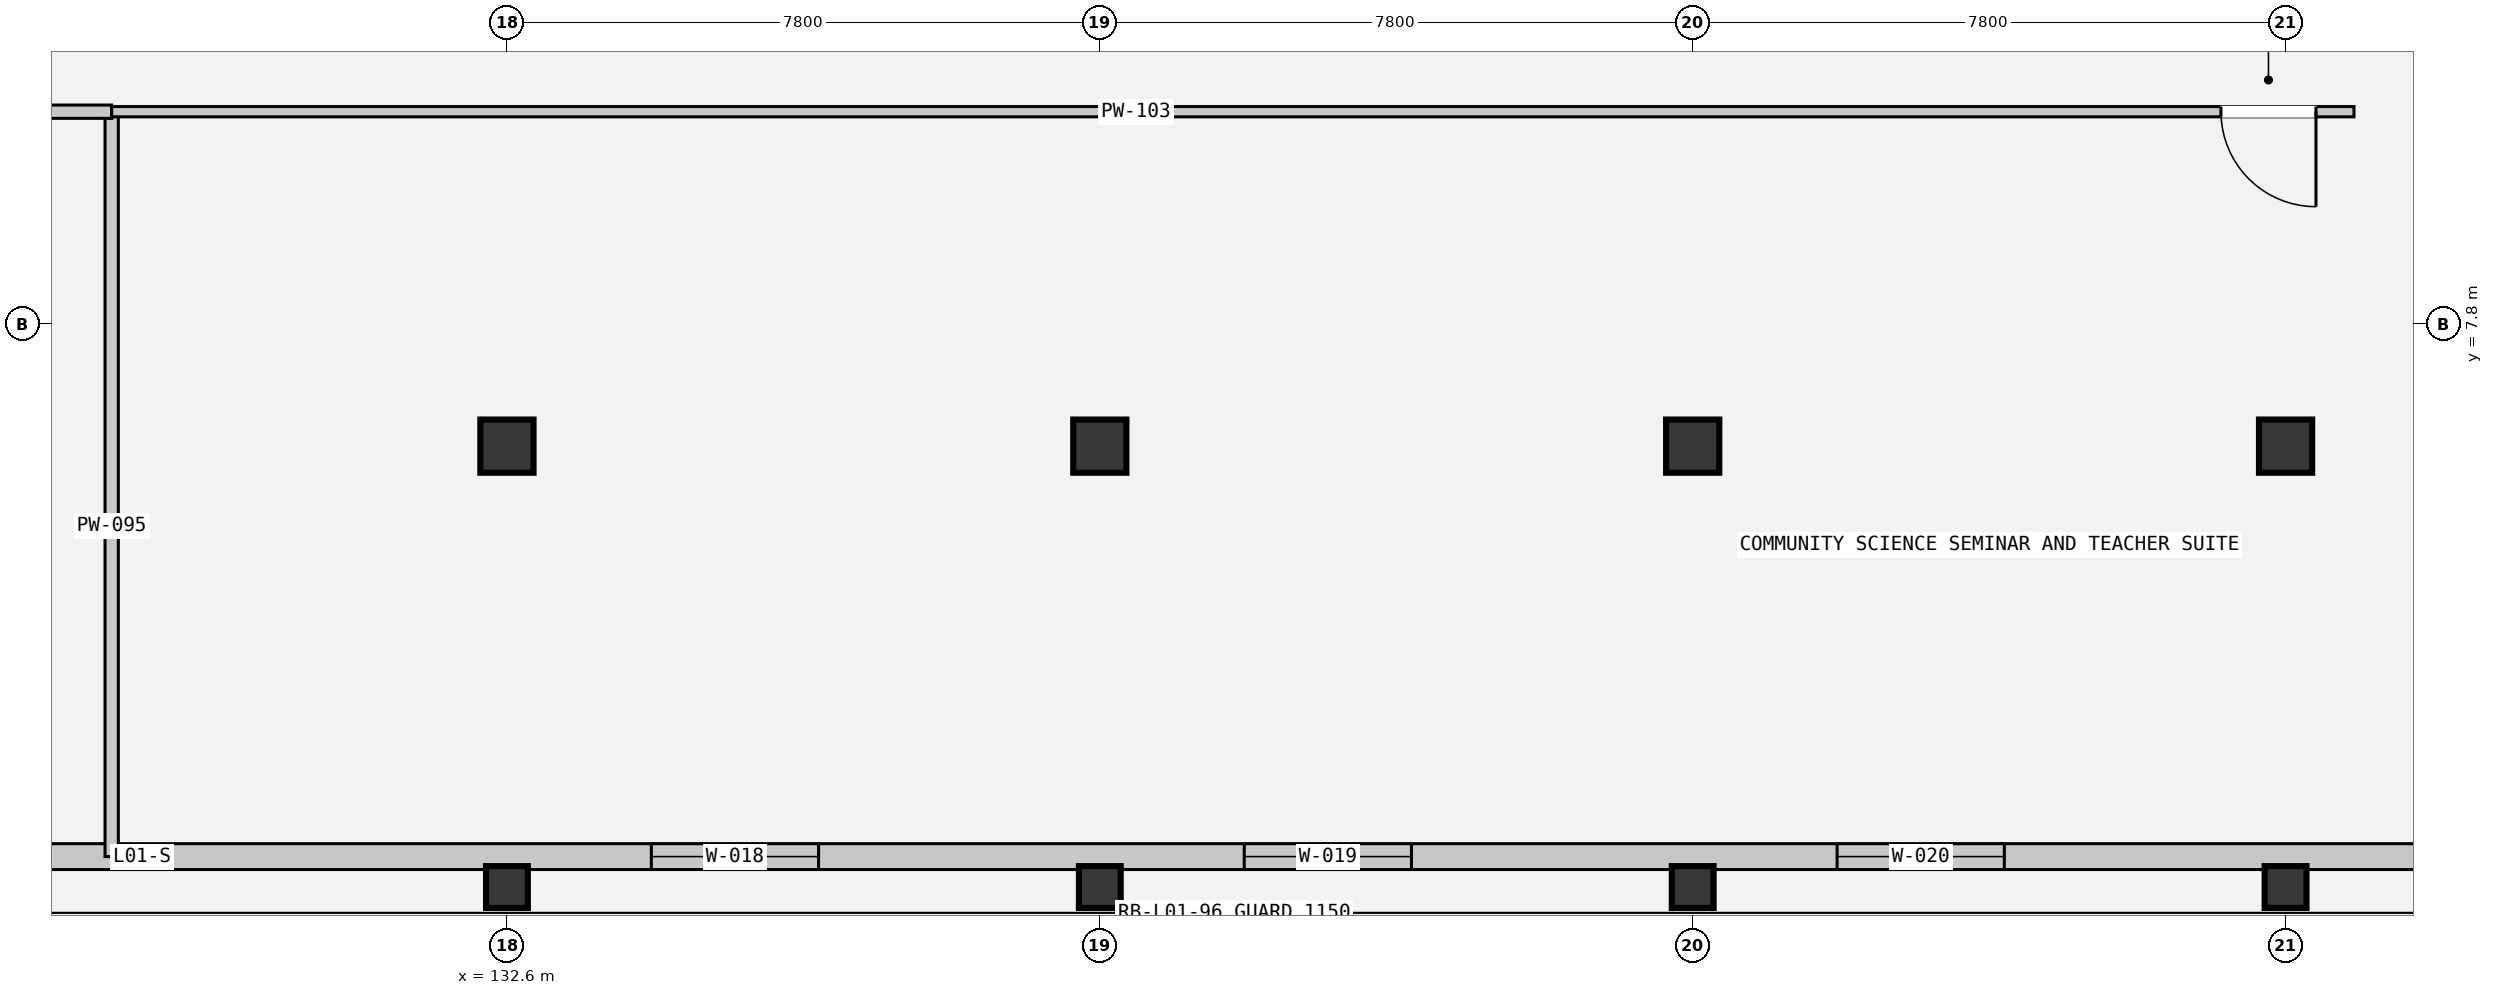
"""IFC4 building model, lengths in metres.
Left out: names, types, materials, properties, quantities, classifications, styles, units other than length and angle.
Written with IfcOpenShell. Run it as: python <this file> out.ifc"""

import sys

from ifc_helpers import new_model, si_unit, direction, frame, frame_2d, origin, origin_2d, place, context, subcontext, project, spatial, rectangle, extrude, element, fill, save


model = new_model("IFC4")
c1 = context("Model", 3, precision=1e-05, world=origin(), true_north=direction((0.0, 1.0)))
c2 = subcontext(c1, "Body", "Model", "MODEL_VIEW")
j1 = project(units=[si_unit("LENGTHUNIT", "METRE"), si_unit("PLANEANGLEUNIT", "RADIAN")], contexts=[c1])
p1 = place(None, origin())
s1 = spatial("IfcSite", under=j1, at=p1, CompositionType="ELEMENT")
p2 = place(p1, origin())
s2 = spatial("IfcBuilding", under=s1, at=p2, CompositionType="ELEMENT")
p3 = place(p2, frame((0.0, 0.0, 5.4)))
s3 = spatial("IfcBuildingStorey", under=s2, at=p3, CompositionType="ELEMENT", Elevation=5.4)
p4 = place(p3, frame((132.6, 0.4, 0.0), z_axis=(0.0, 0.0, 1.0), x_axis=(1.0, 0.0, 0.0)))
e1 = element("IfcColumn", 1, at=p4, inside=s3, PredefinedType="COLUMN", context=c2, shape_type="SweptSolid", body=[
    extrude(rectangle(XDim=0.55, YDim=0.55, at=origin_2d()), origin(), (0.0, 0.0, 1.0), 4.8),
])
p5 = place(p3, frame((132.6, 6.2, 0.0), z_axis=(0.0, 0.0, 1.0), x_axis=(1.0, 0.0, 0.0)))
e2 = element("IfcColumn", 2, at=p5, inside=s3, PredefinedType="COLUMN", context=c2, shape_type="SweptSolid", body=[
    extrude(rectangle(XDim=0.7, YDim=0.7, at=origin_2d()), origin(), (0.0, 0.0, 1.0), 4.8),
])
p6 = place(p3, frame((140.4, 0.4, 0.0), z_axis=(0.0, 0.0, 1.0), x_axis=(1.0, 0.0, 0.0)))
e3 = element("IfcColumn", 3, at=p6, inside=s3, PredefinedType="COLUMN", context=c2, shape_type="SweptSolid", body=[
    extrude(rectangle(XDim=0.55, YDim=0.55, at=origin_2d()), origin(), (0.0, 0.0, 1.0), 4.8),
])
p7 = place(p3, frame((140.4, 6.2, 0.0), z_axis=(0.0, 0.0, 1.0), x_axis=(1.0, 0.0, 0.0)))
e4 = element("IfcColumn", 4, at=p7, inside=s3, PredefinedType="COLUMN", context=c2, shape_type="SweptSolid", body=[
    extrude(rectangle(XDim=0.7, YDim=0.7, at=origin_2d()), origin(), (0.0, 0.0, 1.0), 4.8),
])
p8 = place(p3, frame((148.2, 0.4, 0.0), z_axis=(0.0, 0.0, 1.0), x_axis=(1.0, 0.0, 0.0)))
e5 = element("IfcColumn", 5, at=p8, inside=s3, PredefinedType="COLUMN", context=c2, shape_type="SweptSolid", body=[
    extrude(rectangle(XDim=0.55, YDim=0.55, at=origin_2d()), origin(), (0.0, 0.0, 1.0), 4.8),
])
p9 = place(p3, frame((148.2, 6.2, 0.0), z_axis=(0.0, 0.0, 1.0), x_axis=(1.0, 0.0, 0.0)))
e6 = element("IfcColumn", 6, at=p9, inside=s3, PredefinedType="COLUMN", context=c2, shape_type="SweptSolid", body=[
    extrude(rectangle(XDim=0.7, YDim=0.7, at=origin_2d()), origin(), (0.0, 0.0, 1.0), 4.8),
])
p10 = place(p3, frame((156.0, 0.4, 0.0), z_axis=(0.0, 0.0, 1.0), x_axis=(1.0, 0.0, 0.0)))
e7 = element("IfcColumn", 7, at=p10, inside=s3, PredefinedType="COLUMN", context=c2, shape_type="SweptSolid", body=[
    extrude(rectangle(XDim=0.55, YDim=0.55, at=origin_2d()), origin(), (0.0, 0.0, 1.0), 4.8),
])
p11 = place(p3, frame((156.0, 6.2, 0.0), z_axis=(0.0, 0.0, 1.0), x_axis=(1.0, 0.0, 0.0)))
e8 = element("IfcColumn", 8, at=p11, inside=s3, PredefinedType="COLUMN", context=c2, shape_type="SweptSolid", body=[
    extrude(rectangle(XDim=0.7, YDim=0.7, at=origin_2d()), origin(), (0.0, 0.0, 1.0), 4.8),
])
p12 = place(p3, frame((63.2, 0.8, 0.0), z_axis=(0.0, 0.0, 1.0), x_axis=(1.0, 0.0, 0.0)))
e9 = element("IfcWall", 9, at=p12, inside=s3, PredefinedType="SOLIDWALL", context=c2, shape_type="SweptSolid", body=[
    extrude(rectangle(XDim=100.6, YDim=0.34, at=frame_2d((50.3, 0.0))), origin(), (0.0, 0.0, 1.0), 3.86),
])
p13 = place(p12, frame((1.1, 0.0, 0.78)))
e10 = element("IfcOpeningElement", 10, at=p13, cuts=e9, PredefinedType="OPENING", context=c2, shape_type="SweptSolid", body=[
    extrude(rectangle(XDim=2.2, YDim=2.75, at=frame_2d((1.1, 1.375))), frame((0.0, 0.18, 0.0), z_axis=(0.0, -1.0, 0.0), x_axis=(1.0, 0.0, 0.0)), (0.0, 0.0, 1.0), 0.36),
])
p14 = place(p12, frame((8.9, 0.0, 0.78)))
e11 = element("IfcOpeningElement", 11, at=p14, cuts=e9, PredefinedType="OPENING", context=c2, shape_type="SweptSolid", body=[
    extrude(rectangle(XDim=2.2, YDim=2.75, at=frame_2d((1.1, 1.375))), frame((0.0, 0.18, 0.0), z_axis=(0.0, -1.0, 0.0), x_axis=(1.0, 0.0, 0.0)), (0.0, 0.0, 1.0), 0.36),
])
p15 = place(p12, frame((16.7, 0.0, 0.78)))
e12 = element("IfcOpeningElement", 12, at=p15, cuts=e9, PredefinedType="OPENING", context=c2, shape_type="SweptSolid", body=[
    extrude(rectangle(XDim=2.2, YDim=2.75, at=frame_2d((1.1, 1.375))), frame((0.0, 0.18, 0.0), z_axis=(0.0, -1.0, 0.0), x_axis=(1.0, 0.0, 0.0)), (0.0, 0.0, 1.0), 0.36),
])
p16 = place(p12, frame((24.5, 0.0, 0.78)))
e13 = element("IfcOpeningElement", 13, at=p16, cuts=e9, PredefinedType="OPENING", context=c2, shape_type="SweptSolid", body=[
    extrude(rectangle(XDim=2.2, YDim=2.75, at=frame_2d((1.1, 1.375))), frame((0.0, 0.18, 0.0), z_axis=(0.0, -1.0, 0.0), x_axis=(1.0, 0.0, 0.0)), (0.0, 0.0, 1.0), 0.36),
])
p17 = place(p12, frame((40.1, 0.0, 0.78)))
e14 = element("IfcOpeningElement", 14, at=p17, cuts=e9, PredefinedType="OPENING", context=c2, shape_type="SweptSolid", body=[
    extrude(rectangle(XDim=2.2, YDim=2.75, at=frame_2d((1.1, 1.375))), frame((0.0, 0.18, 0.0), z_axis=(0.0, -1.0, 0.0), x_axis=(1.0, 0.0, 0.0)), (0.0, 0.0, 1.0), 0.36),
])
p18 = place(p12, frame((47.9, 0.0, 0.78)))
e15 = element("IfcOpeningElement", 15, at=p18, cuts=e9, PredefinedType="OPENING", context=c2, shape_type="SweptSolid", body=[
    extrude(rectangle(XDim=2.2, YDim=2.75, at=frame_2d((1.1, 1.375))), frame((0.0, 0.18, 0.0), z_axis=(0.0, -1.0, 0.0), x_axis=(1.0, 0.0, 0.0)), (0.0, 0.0, 1.0), 0.36),
])
p19 = place(p12, frame((55.7, 0.0, 0.78)))
e16 = element("IfcOpeningElement", 16, at=p19, cuts=e9, PredefinedType="OPENING", context=c2, shape_type="SweptSolid", body=[
    extrude(rectangle(XDim=2.2, YDim=2.75, at=frame_2d((1.1, 1.375))), frame((0.0, 0.18, 0.0), z_axis=(0.0, -1.0, 0.0), x_axis=(1.0, 0.0, 0.0)), (0.0, 0.0, 1.0), 0.36),
])
p20 = place(p12, frame((71.3, 0.0, 0.78)))
e17 = element("IfcOpeningElement", 17, at=p20, cuts=e9, PredefinedType="OPENING", context=c2, shape_type="SweptSolid", body=[
    extrude(rectangle(XDim=2.2, YDim=2.75, at=frame_2d((1.1, 1.375))), frame((0.0, 0.18, 0.0), z_axis=(0.0, -1.0, 0.0), x_axis=(1.0, 0.0, 0.0)), (0.0, 0.0, 1.0), 0.36),
])
p21 = place(p12, frame((79.1, 0.0, 0.78)))
e18 = element("IfcOpeningElement", 18, at=p21, cuts=e9, PredefinedType="OPENING", context=c2, shape_type="SweptSolid", body=[
    extrude(rectangle(XDim=2.2, YDim=2.75, at=frame_2d((1.1, 1.375))), frame((0.0, 0.18, 0.0), z_axis=(0.0, -1.0, 0.0), x_axis=(1.0, 0.0, 0.0)), (0.0, 0.0, 1.0), 0.36),
])
p22 = place(p12, frame((86.9, 0.0, 0.78)))
e19 = element("IfcOpeningElement", 19, at=p22, cuts=e9, PredefinedType="OPENING", context=c2, shape_type="SweptSolid", body=[
    extrude(rectangle(XDim=2.2, YDim=2.75, at=frame_2d((1.1, 1.375))), frame((0.0, 0.18, 0.0), z_axis=(0.0, -1.0, 0.0), x_axis=(1.0, 0.0, 0.0)), (0.0, 0.0, 1.0), 0.36),
])
p23 = place(p12, frame((94.7, 0.0, 0.78)))
e20 = element("IfcOpeningElement", 20, at=p23, cuts=e9, PredefinedType="OPENING", context=c2, shape_type="SweptSolid", body=[
    extrude(rectangle(XDim=2.2, YDim=2.75, at=frame_2d((1.1, 1.375))), frame((0.0, 0.18, 0.0), z_axis=(0.0, -1.0, 0.0), x_axis=(1.0, 0.0, 0.0)), (0.0, 0.0, 1.0), 0.36),
])
p24 = place(p3, frame((127.4, 0.8, 0.0), z_axis=(0.0, 0.0, 1.0), x_axis=(0.0, 1.0, 0.0)))
e21 = element("IfcWall", 21, at=p24, inside=s3, PredefinedType="PARTITIONING", context=c2, shape_type="SweptSolid", body=[
    extrude(rectangle(XDim=9.8, YDim=0.175, at=frame_2d((4.9, 0.0))), origin(), (0.0, 0.0, 1.0), 3.45),
])
p25 = place(p3, frame((127.4, 10.6, 0.0), z_axis=(0.0, 0.0, 1.0), x_axis=(-1.0, 0.0, 0.0)))
e22 = element("IfcWall", 22, at=p25, inside=s3, PredefinedType="PARTITIONING", context=c2, shape_type="SweptSolid", body=[
    extrude(rectangle(XDim=31.6, YDim=0.175, at=frame_2d((15.8, 0.0))), origin(), (0.0, 0.0, 1.0), 3.45),
])
p26 = place(p25, frame((1.101, 0.0, 0.0)))
e23 = element("IfcOpeningElement", 23, at=p26, cuts=e22, PredefinedType="OPENING", context=c2, shape_type="SweptSolid", body=[
    extrude(rectangle(XDim=1.55, YDim=2.25, at=frame_2d((0.775, 1.125))), frame((0.0, 0.097, 0.0), z_axis=(0.0, -1.0, 0.0), x_axis=(1.0, 0.0, 0.0)), (0.0, 0.0, 1.0), 0.195),
])
p27 = place(p3, frame((156.9, 10.6, 0.0), z_axis=(0.0, 0.0, 1.0), x_axis=(-1.0, 0.0, 0.0)))
e24 = element("IfcWall", 24, at=p27, inside=s3, PredefinedType="PARTITIONING", context=c2, shape_type="SweptSolid", body=[
    extrude(rectangle(XDim=29.5, YDim=0.135, at=frame_2d((14.75, 0.0))), origin(), (0.0, 0.0, 1.0), 3.45),
])
p28 = place(p27, frame((0.5, 0.0, 0.0)))
e25 = element("IfcOpeningElement", 25, at=p28, cuts=e24, PredefinedType="OPENING", context=c2, shape_type="SweptSolid", body=[
    extrude(rectangle(XDim=1.25, YDim=2.2, at=frame_2d((0.625, 1.1))), frame((0.0, 0.077, 0.0), z_axis=(0.0, -1.0, 0.0), x_axis=(1.0, 0.0, 0.0)), (0.0, 0.0, 1.0), 0.155),
])
p29 = place(p20, origin())
e26 = element("IfcWindow", 26, at=p29, inside=s3, PartitioningType="SINGLE_PANEL", PredefinedType="WINDOW", context=c2, shape_type="SweptSolid", body=[
    extrude(rectangle(XDim=2.2, YDim=2.75, at=frame_2d((1.1, 1.375))), frame((0.0, 0.03, 0.0), z_axis=(0.0, -1.0, 0.0), x_axis=(1.0, 0.0, 0.0)), (0.0, 0.0, 1.0), 0.06),
])
fill(e17, e26)
p30 = place(p21, origin())
e27 = element("IfcWindow", 27, at=p30, inside=s3, PartitioningType="SINGLE_PANEL", PredefinedType="WINDOW", context=c2, shape_type="SweptSolid", body=[
    extrude(rectangle(XDim=2.2, YDim=2.75, at=frame_2d((1.1, 1.375))), frame((0.0, 0.03, 0.0), z_axis=(0.0, -1.0, 0.0), x_axis=(1.0, 0.0, 0.0)), (0.0, 0.0, 1.0), 0.06),
])
fill(e18, e27)
p31 = place(p22, origin())
e28 = element("IfcWindow", 28, at=p31, inside=s3, PartitioningType="SINGLE_PANEL", PredefinedType="WINDOW", context=c2, shape_type="SweptSolid", body=[
    extrude(rectangle(XDim=2.2, YDim=2.75, at=frame_2d((1.1, 1.375))), frame((0.0, 0.03, 0.0), z_axis=(0.0, -1.0, 0.0), x_axis=(1.0, 0.0, 0.0)), (0.0, 0.0, 1.0), 0.06),
])
fill(e19, e28)
p32 = place(p28, origin())
e29 = element("IfcDoor", 29, at=p32, inside=s3, OperationType="SINGLE_SWING_LEFT", PredefinedType="DOOR", context=c2, shape_type="SweptSolid", body=[
    extrude(rectangle(XDim=1.25, YDim=2.2, at=frame_2d((0.625, 1.1))), frame((0.0, 0.025, 0.0), z_axis=(0.0, -1.0, 0.0), x_axis=(1.0, 0.0, 0.0)), (0.0, 0.0, 1.0), 0.05),
])
fill(e25, e29)
save(model, sys.argv[1])
